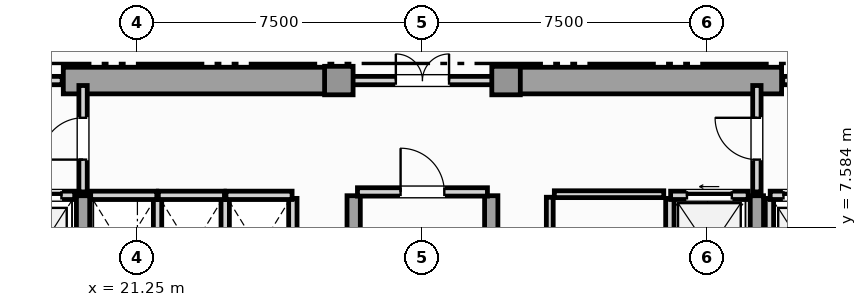
"""IFC4 building model, lengths in metres.
Left out: names, types, materials, properties, quantities, classifications, styles, units other than length and angle.
Written with IfcOpenShell. Run it as: python <this file> out.ifc"""

import sys

from ifc_helpers import new_model, si_unit, direction, frame, frame_2d, origin, origin_2d, place, context, subcontext, project, spatial, rectangle, extrude, element, fill, save


model = new_model("IFC4")
c1 = context("Model", 3, precision=1e-05, world=origin(), true_north=direction((0.0, 1.0)))
c2 = subcontext(c1, "Body", "Model", "MODEL_VIEW")
j1 = project(units=[si_unit("LENGTHUNIT", "METRE"), si_unit("PLANEANGLEUNIT", "RADIAN")], contexts=[c1])
p1 = place(None, origin())
s1 = spatial("IfcSite", under=j1, at=p1, CompositionType="ELEMENT")
p2 = place(p1, origin())
s2 = spatial("IfcBuilding", under=s1, at=p2, CompositionType="ELEMENT")
p3 = place(p2, frame((0.0, 0.0, 92.6)))
s3 = spatial("IfcBuildingStorey", under=s2, at=p3, CompositionType="ELEMENT", Elevation=92.6)
for number, where, z_axis, x_axis in (
    (1, (19.3, 11.45, 0.0), (0.0, 0.0, 1.0), (1.0, 0.0, 0.0)),
    (2, (30.9, 11.45, 0.0), (0.0, 0.0, 1.0), (1.0, 0.0, 0.0)),
):
    element("IfcWall", number, at=place(p3, frame(where, z_axis=z_axis, x_axis=x_axis)), inside=s3, PredefinedType="SHEAR", context=c2, shape_type="SweptSolid", body=[
        extrude(rectangle(XDim=7.3, YDim=0.7, at=frame_2d((3.65, 0.0))), origin(), (0.0, 0.0, 1.0), 3.6),
    ])
for number, where, z_axis, x_axis in (
    (3, (19.82, 0.92, 0.0), (0.0, 0.0, 1.0), (0.0, 1.0, 0.0)),
    (4, (26.94, 0.92, 0.0), (0.0, 0.0, 1.0), (0.0, 1.0, 0.0)),
    (5, (30.56, 0.92, 0.0), (0.0, 0.0, 1.0), (0.0, 1.0, 0.0)),
    (6, (37.55, 0.92, 0.0), (0.0, 0.0, 1.0), (0.0, 1.0, 0.0)),
):
    element("IfcWall", number, at=place(p3, frame(where, z_axis=z_axis, x_axis=x_axis)), inside=s3, PredefinedType="SHEAR", context=c2, shape_type="SweptSolid", body=[
        extrude(rectangle(XDim=7.5, YDim=0.35, at=frame_2d((3.75, 0.0))), origin(), (0.0, 0.0, 1.0), 3.6),
    ])
for number, where, z_axis, x_axis in (
    (7, (26.55, 11.45, 0.0), (0.0, 0.0, 1.0), (1.0, 0.0, 0.0)),
    (8, (30.95, 11.45, 0.0), (0.0, 0.0, 1.0), (1.0, 0.0, 0.0)),
):
    element("IfcColumn", number, at=place(p3, frame(where, z_axis=z_axis, x_axis=x_axis)), inside=s3, PredefinedType="COLUMN", context=c2, shape_type="SweptSolid", body=[
        extrude(rectangle(XDim=0.75, YDim=0.75, at=origin_2d()), origin(), (0.0, 0.0, 1.0), 3.85),
    ])
p4 = place(p3, frame((17.78, 8.43, 0.0), z_axis=(0.0, 0.0, 1.0), x_axis=(1.0, 0.0, 0.0)))
e9 = element("IfcWall", 9, at=p4, inside=s3, PredefinedType="SOLIDWALL", context=c2, shape_type="SweptSolid", body=[
    extrude(rectangle(XDim=1.82, YDim=0.22, at=frame_2d((0.91, 0.0))), origin(), (0.0, 0.0, 1.0), 3.6),
])
p5 = place(p4, frame((0.35, 0.0, 0.0)))
e10 = element("IfcOpeningElement", 10, at=p5, cuts=e9, PredefinedType="OPENING", context=c2, shape_type="SweptSolid", body=[
    extrude(rectangle(XDim=1.12, YDim=2.25, at=frame_2d((0.56, 1.125))), frame((0.0, 0.12, 0.0), z_axis=(0.0, -1.0, 0.0), x_axis=(1.0, 0.0, 0.0)), (0.0, 0.0, 1.0), 0.24),
])
p6 = place(p3, frame((37.88, 5.65, 0.0), z_axis=(0.0, 0.0, 1.0), x_axis=(0.0, 1.0, 0.0)))
e11 = element("IfcWall", 11, at=p6, inside=s3, PredefinedType="SOLIDWALL", context=c2, shape_type="SweptSolid", body=[
    extrude(rectangle(XDim=2.7, YDim=0.22, at=frame_2d((1.35, 0.0))), origin(), (0.0, 0.0, 1.0), 3.6),
])
p7 = place(p3, frame((37.9, 8.43, 0.0), z_axis=(0.0, 0.0, 1.0), x_axis=(1.0, 0.0, 0.0)))
e12 = element("IfcWall", 12, at=p7, inside=s3, PredefinedType="SOLIDWALL", context=c2, shape_type="SweptSolid", body=[
    extrude(rectangle(XDim=1.82, YDim=0.22, at=frame_2d((0.91, 0.0))), origin(), (0.0, 0.0, 1.0), 3.6),
])
p8 = place(p7, frame((0.35, 0.0, 0.0)))
e13 = element("IfcOpeningElement", 13, at=p8, cuts=e12, PredefinedType="OPENING", context=c2, shape_type="SweptSolid", body=[
    extrude(rectangle(XDim=1.12, YDim=2.25, at=frame_2d((0.56, 1.125))), frame((0.0, 0.12, 0.0), z_axis=(0.0, -1.0, 0.0), x_axis=(1.0, 0.0, 0.0)), (0.0, 0.0, 1.0), 0.24),
])
p9 = place(p3, frame((35.26, 5.65, 0.0), z_axis=(0.0, 0.0, 1.0), x_axis=(0.0, 1.0, 0.0)))
e14 = element("IfcWall", 14, at=p9, inside=s3, PredefinedType="SOLIDWALL", context=c2, shape_type="SweptSolid", body=[
    extrude(rectangle(XDim=2.7, YDim=0.22, at=frame_2d((1.35, 0.0))), origin(), (0.0, 0.0, 1.0), 3.6),
])
p10 = place(p3, frame((35.28, 8.43, 0.0), z_axis=(0.0, 0.0, 1.0), x_axis=(1.0, 0.0, 0.0)))
e15 = element("IfcWall", 15, at=p10, inside=s3, PredefinedType="SOLIDWALL", context=c2, shape_type="SweptSolid", body=[
    extrude(rectangle(XDim=2.04, YDim=0.22, at=frame_2d((1.02, 0.0))), origin(), (0.0, 0.0, 1.0), 3.6),
])
p11 = place(p10, frame((0.43, 0.0, 0.0)))
e16 = element("IfcOpeningElement", 16, at=p11, cuts=e15, PredefinedType="OPENING", context=c2, shape_type="SweptSolid", body=[
    extrude(rectangle(XDim=1.18, YDim=2.2, at=frame_2d((0.59, 1.1))), frame((0.0, 0.12, 0.0), z_axis=(0.0, -1.0, 0.0), x_axis=(1.0, 0.0, 0.0)), (0.0, 0.0, 1.0), 0.24),
])
p12 = place(p3, frame((21.78, 5.65, 0.0), z_axis=(0.0, 0.0, 1.0), x_axis=(0.0, 1.0, 0.0)))
e17 = element("IfcWall", 17, at=p12, inside=s3, PredefinedType="SOLIDWALL", context=c2, shape_type="SweptSolid", body=[
    extrude(rectangle(XDim=2.7, YDim=0.22, at=frame_2d((1.35, 0.0))), origin(), (0.0, 0.0, 1.0), 3.6),
])
p13 = place(p3, frame((20.02, 8.43, 0.0), z_axis=(0.0, 0.0, 1.0), x_axis=(1.0, 0.0, 0.0)))
e18 = element("IfcWall", 18, at=p13, inside=s3, PredefinedType="SOLIDWALL", context=c2, shape_type="SweptSolid", body=[
    extrude(rectangle(XDim=1.74, YDim=0.22, at=frame_2d((0.87, 0.0))), origin(), (0.0, 0.0, 1.0), 3.6),
])
p14 = place(p3, frame((23.56, 5.65, 0.0), z_axis=(0.0, 0.0, 1.0), x_axis=(0.0, 1.0, 0.0)))
e19 = element("IfcWall", 19, at=p14, inside=s3, PredefinedType="SOLIDWALL", context=c2, shape_type="SweptSolid", body=[
    extrude(rectangle(XDim=2.7, YDim=0.22, at=frame_2d((1.35, 0.0))), origin(), (0.0, 0.0, 1.0), 3.6),
])
p15 = place(p3, frame((21.8, 8.43, 0.0), z_axis=(0.0, 0.0, 1.0), x_axis=(1.0, 0.0, 0.0)))
e20 = element("IfcWall", 20, at=p15, inside=s3, PredefinedType="SOLIDWALL", context=c2, shape_type="SweptSolid", body=[
    extrude(rectangle(XDim=1.74, YDim=0.22, at=frame_2d((0.87, 0.0))), origin(), (0.0, 0.0, 1.0), 3.6),
])
p16 = place(p3, frame((25.34, 5.65, 0.0), z_axis=(0.0, 0.0, 1.0), x_axis=(0.0, 1.0, 0.0)))
e21 = element("IfcWall", 21, at=p16, inside=s3, PredefinedType="SOLIDWALL", context=c2, shape_type="SweptSolid", body=[
    extrude(rectangle(XDim=2.7, YDim=0.22, at=frame_2d((1.35, 0.0))), origin(), (0.0, 0.0, 1.0), 3.6),
])
p17 = place(p3, frame((23.58, 8.43, 0.0), z_axis=(0.0, 0.0, 1.0), x_axis=(1.0, 0.0, 0.0)))
e22 = element("IfcWall", 22, at=p17, inside=s3, PredefinedType="SOLIDWALL", context=c2, shape_type="SweptSolid", body=[
    extrude(rectangle(XDim=1.74, YDim=0.22, at=frame_2d((0.87, 0.0))), origin(), (0.0, 0.0, 1.0), 3.6),
])
p18 = place(p3, frame((27.04, 8.52, 0.0), z_axis=(0.0, 0.0, 1.0), x_axis=(1.0, 0.0, 0.0)))
e23 = element("IfcWall", 23, at=p18, inside=s3, PredefinedType="SOLIDWALL", context=c2, shape_type="SweptSolid", body=[
    extrude(rectangle(XDim=3.42, YDim=0.22, at=frame_2d((1.71, 0.0))), origin(), (0.0, 0.0, 1.0), 3.6),
])
p19 = place(p18, frame((1.135, 0.0, 0.0)))
e24 = element("IfcOpeningElement", 24, at=p19, cuts=e23, PredefinedType="OPENING", context=c2, shape_type="SweptSolid", body=[
    extrude(rectangle(XDim=1.15, YDim=2.2, at=frame_2d((0.575, 1.1))), frame((0.0, 0.12, 0.0), z_axis=(0.0, -1.0, 0.0), x_axis=(1.0, 0.0, 0.0)), (0.0, 0.0, 1.0), 0.24),
])
p20 = place(p3, frame((19.82, 8.52, 0.0), z_axis=(0.0, 0.0, 1.0), x_axis=(0.0, 1.0, 0.0)))
e25 = element("IfcWall", 25, at=p20, inside=s3, PredefinedType="SOLIDWALL", context=c2, shape_type="SweptSolid", body=[
    extrude(rectangle(XDim=2.8, YDim=0.22, at=frame_2d((1.4, 0.0))), origin(), (0.0, 0.0, 1.0), 3.055),
])
p21 = place(p20, frame((0.85, 0.0, 0.0)))
e26 = element("IfcOpeningElement", 26, at=p21, cuts=e25, PredefinedType="OPENING", context=c2, shape_type="SweptSolid", body=[
    extrude(rectangle(XDim=1.1, YDim=2.2, at=frame_2d((0.55, 1.1))), frame((0.0, 0.12, 0.0), z_axis=(0.0, -1.0, 0.0), x_axis=(1.0, 0.0, 0.0)), (0.0, 0.0, 1.0), 0.24),
])
p22 = place(p3, frame((37.55, 8.52, 0.0), z_axis=(0.0, 0.0, 1.0), x_axis=(0.0, 1.0, 0.0)))
e27 = element("IfcWall", 27, at=p22, inside=s3, PredefinedType="SOLIDWALL", context=c2, shape_type="SweptSolid", body=[
    extrude(rectangle(XDim=2.8, YDim=0.22, at=frame_2d((1.4, 0.0))), origin(), (0.0, 0.0, 1.0), 3.055),
])
p23 = place(p22, frame((0.85, 0.0, 0.0)))
e28 = element("IfcOpeningElement", 28, at=p23, cuts=e27, PredefinedType="OPENING", context=c2, shape_type="SweptSolid", body=[
    extrude(rectangle(XDim=1.1, YDim=2.2, at=frame_2d((0.55, 1.1))), frame((0.0, 0.12, 0.0), z_axis=(0.0, -1.0, 0.0), x_axis=(1.0, 0.0, 0.0)), (0.0, 0.0, 1.0), 0.24),
])
p24 = place(p3, frame((16.23, 11.45, 0.0), z_axis=(0.0, 0.0, 1.0), x_axis=(1.0, 0.0, 0.0)))
e29 = element("IfcWall", 29, at=p24, inside=s3, PredefinedType="SOLIDWALL", context=c2, shape_type="SweptSolid", body=[
    extrude(rectangle(XDim=3.04, YDim=0.22, at=frame_2d((1.52, 0.0))), origin(), (0.0, 0.0, 1.0), 3.6),
])
p25 = place(p24, frame((0.97, 0.0, 0.0)))
e30 = element("IfcOpeningElement", 30, at=p25, cuts=e29, PredefinedType="OPENING", context=c2, shape_type="SweptSolid", body=[
    extrude(rectangle(XDim=1.1, YDim=2.2, at=frame_2d((0.55, 1.1))), frame((0.0, 0.12, 0.0), z_axis=(0.0, -1.0, 0.0), x_axis=(1.0, 0.0, 0.0)), (0.0, 0.0, 1.0), 0.24),
])
p26 = place(p3, frame((26.63, 11.45, 0.0), z_axis=(0.0, 0.0, 1.0), x_axis=(1.0, 0.0, 0.0)))
e31 = element("IfcWall", 31, at=p26, inside=s3, PredefinedType="SOLIDWALL", context=c2, shape_type="SweptSolid", body=[
    extrude(rectangle(XDim=4.24, YDim=0.22, at=frame_2d((2.12, 0.0))), origin(), (0.0, 0.0, 1.0), 3.6),
])
p27 = place(p26, frame((1.42, 0.0, 0.0)))
e32 = element("IfcOpeningElement", 32, at=p27, cuts=e31, PredefinedType="OPENING", context=c2, shape_type="SweptSolid", body=[
    extrude(rectangle(XDim=1.4, YDim=2.2, at=frame_2d((0.7, 1.1))), frame((0.0, 0.12, 0.0), z_axis=(0.0, -1.0, 0.0), x_axis=(1.0, 0.0, 0.0)), (0.0, 0.0, 1.0), 0.24),
])
p28 = place(p3, frame((38.23, 11.45, 0.0), z_axis=(0.0, 0.0, 1.0), x_axis=(1.0, 0.0, 0.0)))
e33 = element("IfcWall", 33, at=p28, inside=s3, PredefinedType="SOLIDWALL", context=c2, shape_type="SweptSolid", body=[
    extrude(rectangle(XDim=3.04, YDim=0.22, at=frame_2d((1.52, 0.0))), origin(), (0.0, 0.0, 1.0), 3.6),
])
p29 = place(p28, frame((0.97, 0.0, 0.0)))
e34 = element("IfcOpeningElement", 34, at=p29, cuts=e33, PredefinedType="OPENING", context=c2, shape_type="SweptSolid", body=[
    extrude(rectangle(XDim=1.1, YDim=2.2, at=frame_2d((0.55, 1.1))), frame((0.0, 0.12, 0.0), z_axis=(0.0, -1.0, 0.0), x_axis=(1.0, 0.0, 0.0)), (0.0, 0.0, 1.0), 0.24),
])
p30 = place(p3, frame((32.1, 5.65, 0.0), z_axis=(0.0, 0.0, 1.0), x_axis=(0.0, 1.0, 0.0)))
e35 = element("IfcWall", 35, at=p30, inside=s3, PredefinedType="PARTITIONING", context=c2, shape_type="SweptSolid", body=[
    extrude(rectangle(XDim=2.73, YDim=0.18, at=frame_2d((1.365, 0.0))), origin(), (0.0, 0.0, 1.0), 3.6),
])
p31 = place(p30, frame((0.925, 0.0, 0.0)))
e36 = element("IfcOpeningElement", 36, at=p31, cuts=e35, PredefinedType="OPENING", context=c2, shape_type="SweptSolid", body=[
    extrude(rectangle(XDim=0.88, YDim=2.05, at=frame_2d((0.44, 1.025))), frame((0.0, 0.1, 0.0), z_axis=(0.0, -1.0, 0.0), x_axis=(1.0, 0.0, 0.0)), (0.0, 0.0, 1.0), 0.2),
])
p32 = place(p3, frame((32.22, 8.46, 0.0), z_axis=(0.0, 0.0, 1.0), x_axis=(1.0, 0.0, 0.0)))
e37 = element("IfcWall", 37, at=p32, inside=s3, PredefinedType="PARTITIONING", context=c2, shape_type="SweptSolid", body=[
    extrude(rectangle(XDim=2.88, YDim=0.18, at=frame_2d((1.44, 0.0))), origin(), (0.0, 0.0, 1.0), 3.6),
])
p33 = place(p5, origin())
e38 = element("IfcDoor", 38, at=p33, inside=s3, OperationType="SLIDING_TO_LEFT", PredefinedType="DOOR", context=c2, shape_type="SweptSolid", body=[
    extrude(rectangle(XDim=1.12, YDim=2.25, at=frame_2d((0.56, 1.125))), frame((0.0, 0.025, 0.0), z_axis=(0.0, -1.0, 0.0), x_axis=(1.0, 0.0, 0.0)), (0.0, 0.0, 1.0), 0.05),
])
fill(e10, e38)
p34 = place(p8, origin())
e39 = element("IfcDoor", 39, at=p34, inside=s3, OperationType="SLIDING_TO_RIGHT", PredefinedType="DOOR", context=c2, shape_type="SweptSolid", body=[
    extrude(rectangle(XDim=1.12, YDim=2.25, at=frame_2d((0.56, 1.125))), frame((0.0, 0.025, 0.0), z_axis=(0.0, -1.0, 0.0), x_axis=(1.0, 0.0, 0.0)), (0.0, 0.0, 1.0), 0.05),
])
fill(e13, e39)
p35 = place(p11, origin())
e40 = element("IfcDoor", 40, at=p35, inside=s3, OperationType="SLIDING_TO_LEFT", PredefinedType="DOOR", context=c2, shape_type="SweptSolid", body=[
    extrude(rectangle(XDim=1.18, YDim=2.2, at=frame_2d((0.59, 1.1))), frame((0.0, 0.025, 0.0), z_axis=(0.0, -1.0, 0.0), x_axis=(1.0, 0.0, 0.0)), (0.0, 0.0, 1.0), 0.05),
])
fill(e16, e40)
p36 = place(p19, origin())
e41 = element("IfcDoor", 41, at=p36, inside=s3, OperationType="SINGLE_SWING_LEFT", PredefinedType="DOOR", context=c2, shape_type="SweptSolid", body=[
    extrude(rectangle(XDim=1.15, YDim=2.2, at=frame_2d((0.575, 1.1))), frame((0.0, 0.025, 0.0), z_axis=(0.0, -1.0, 0.0), x_axis=(1.0, 0.0, 0.0)), (0.0, 0.0, 1.0), 0.05),
])
fill(e24, e41)
p37 = place(p21, origin())
e42 = element("IfcDoor", 42, at=p37, inside=s3, OperationType="SINGLE_SWING_LEFT", PredefinedType="DOOR", context=c2, shape_type="SweptSolid", body=[
    extrude(rectangle(XDim=1.1, YDim=2.2, at=frame_2d((0.55, 1.1))), frame((0.0, 0.025, 0.0), z_axis=(0.0, -1.0, 0.0), x_axis=(1.0, 0.0, 0.0)), (0.0, 0.0, 1.0), 0.05),
])
fill(e26, e42)
p38 = place(p23, origin())
e43 = element("IfcDoor", 43, at=p38, inside=s3, OperationType="SINGLE_SWING_RIGHT", PredefinedType="DOOR", context=c2, shape_type="SweptSolid", body=[
    extrude(rectangle(XDim=1.1, YDim=2.2, at=frame_2d((0.55, 1.1))), frame((0.0, 0.025, 0.0), z_axis=(0.0, -1.0, 0.0), x_axis=(1.0, 0.0, 0.0)), (0.0, 0.0, 1.0), 0.05),
])
fill(e28, e43)
p39 = place(p27, origin())
e44 = element("IfcDoor", 44, at=p39, inside=s3, OperationType="DOUBLE_DOOR_SINGLE_SWING", PredefinedType="DOOR", context=c2, shape_type="SweptSolid", body=[
    extrude(rectangle(XDim=1.4, YDim=2.2, at=frame_2d((0.7, 1.1))), frame((0.0, 0.025, 0.0), z_axis=(0.0, -1.0, 0.0), x_axis=(1.0, 0.0, 0.0)), (0.0, 0.0, 1.0), 0.05),
])
fill(e32, e44)
save(model, sys.argv[1])
